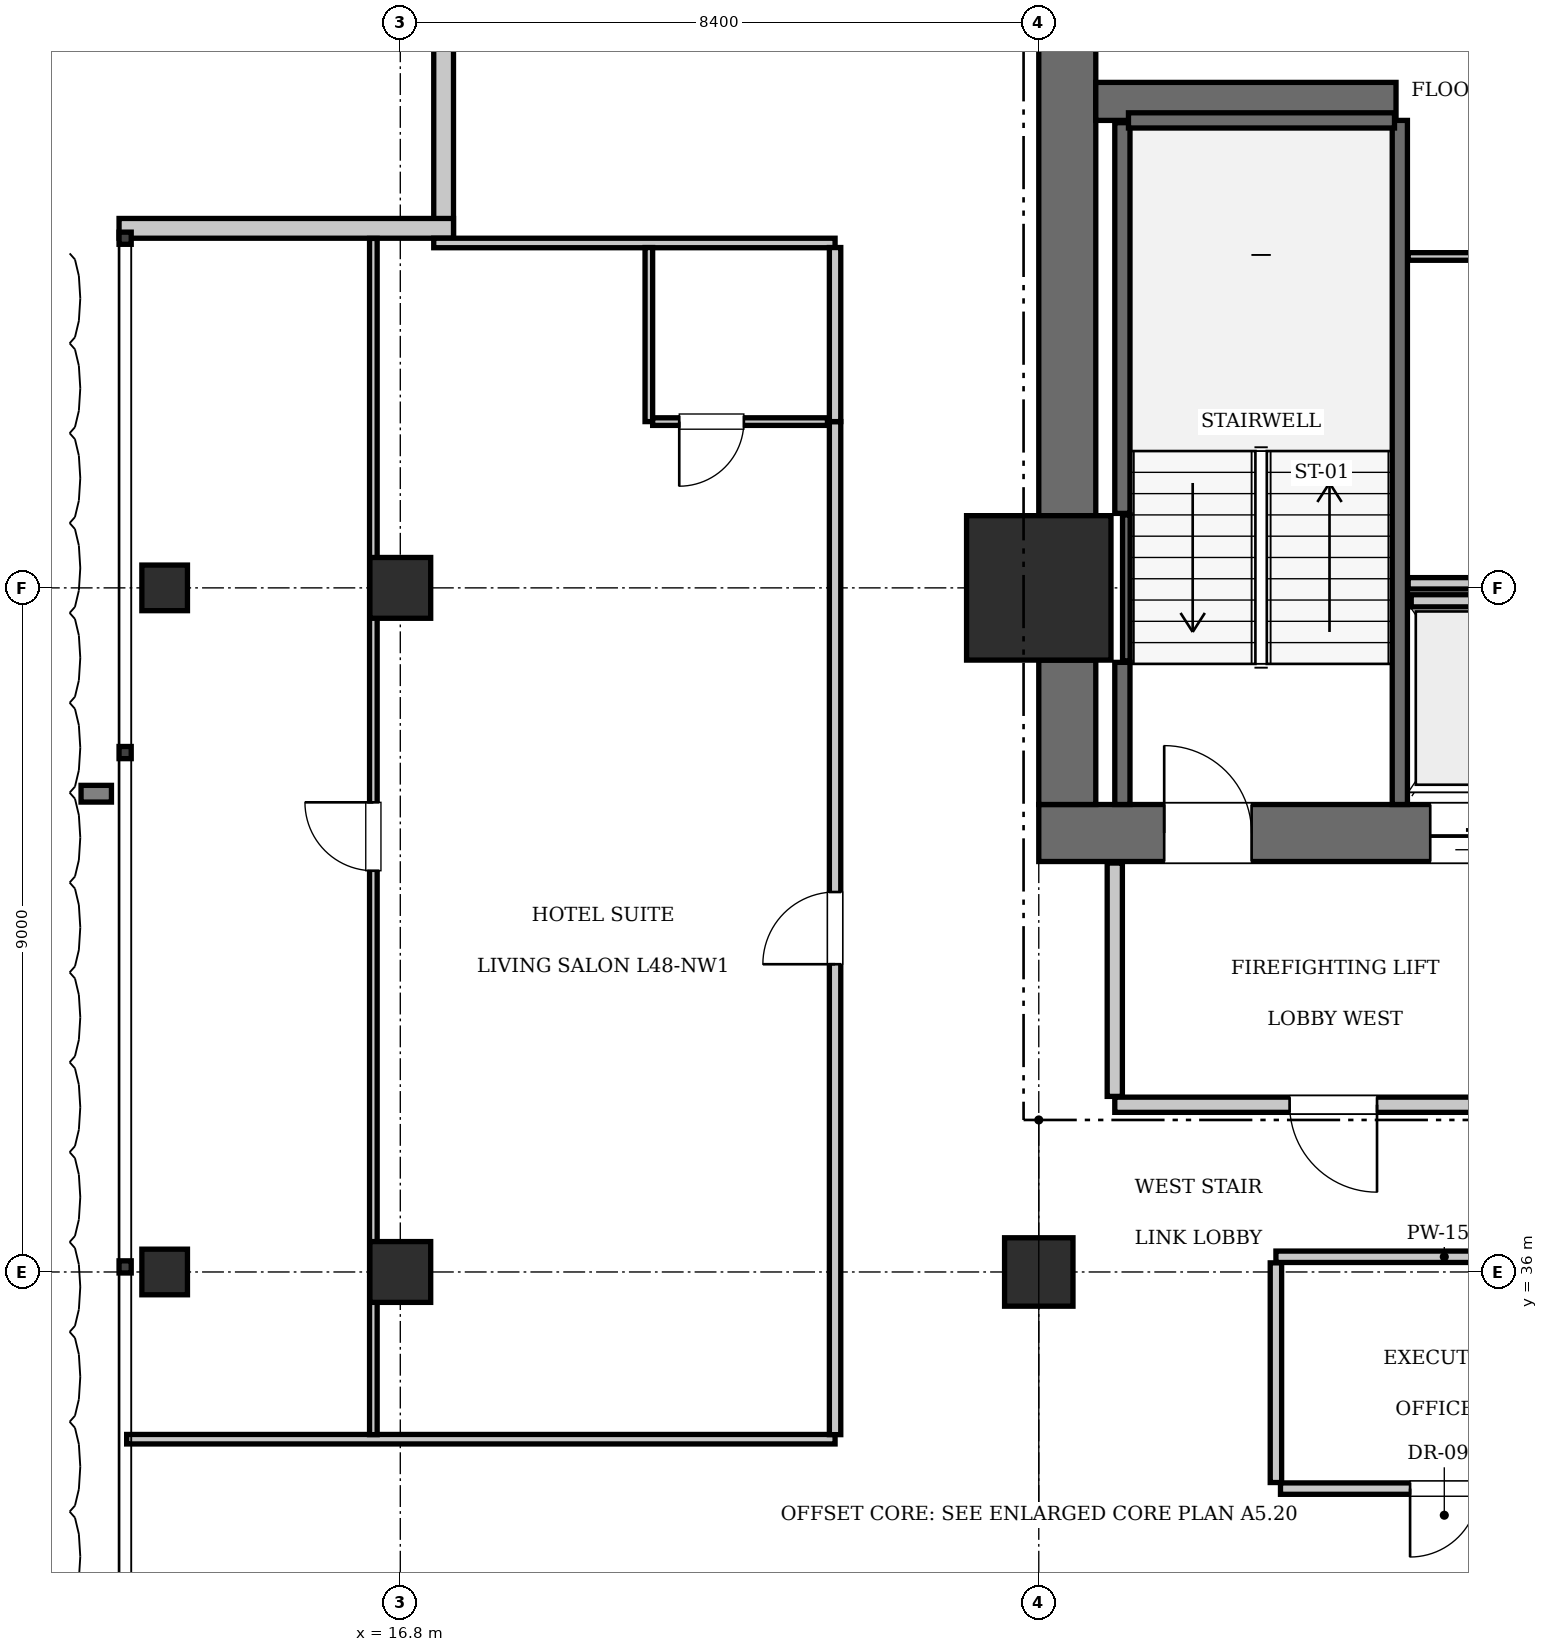
"""IFC4 building model, lengths in metres.
Left out: names, types, materials, properties, quantities, classifications, styles, units other than length and angle.
Written with IfcOpenShell. Run it as: python <this file> out.ifc"""

import sys

from ifc_helpers import new_model, si_unit, direction, frame, frame_2d, origin, origin_2d, place, context, subcontext, project, spatial, rectangle, i_section, extrude, element, fill, save


model = new_model("IFC4")
c1 = context("Model", 3, precision=1e-05, world=origin(), true_north=direction((0.0, 1.0)))
c2 = subcontext(c1, "Body", "Model", "MODEL_VIEW")
j1 = project(units=[si_unit("LENGTHUNIT", "METRE"), si_unit("PLANEANGLEUNIT", "RADIAN")], contexts=[c1])
p1 = place(None, origin())
s1 = spatial("IfcSite", under=j1, at=p1, CompositionType="ELEMENT")
p2 = place(p1, origin())
s2 = spatial("IfcBuilding", under=s1, at=p2, CompositionType="ELEMENT")
p3 = place(p2, frame((0.0, 0.0, 196.7)))
s3 = spatial("IfcBuildingStorey", under=s2, at=p3, CompositionType="ELEMENT", Elevation=196.7)
p4 = place(p3, frame((25.2, 45.0, 0.0), z_axis=(0.0, 0.0, 1.0), x_axis=(1.0, 0.0, 0.0)))
e1 = element("IfcColumn", 1, at=p4, inside=s3, PredefinedType="COLUMN", context=c2, shape_type="SweptSolid", body=[
    extrude(rectangle(XDim=1.9, YDim=1.9, at=origin_2d()), origin(), (0.0, 0.0, 1.0), 3.85),
])
p5 = place(p3, frame((25.2, 41.775, 0.0), z_axis=(0.0, 0.0, 1.0), x_axis=(1.0, 0.0, 0.0)))
e2 = element("IfcWall", 2, at=p5, inside=s3, PredefinedType="SHEAR", context=c2, shape_type="SweptSolid", body=[
    extrude(rectangle(XDim=6.8, YDim=0.75, at=frame_2d((3.4, 0.0))), origin(), (0.0, 0.0, 1.0), 3.85),
])
p6 = place(p5, frame((1.65, 0.0, 0.0)))
e3 = element("IfcOpeningElement", 3, at=p6, cuts=e2, PredefinedType="OPENING", context=c2, shape_type="SweptSolid", body=[
    extrude(rectangle(XDim=1.15, YDim=2.15, at=frame_2d((0.575, 1.075))), frame((0.0, 0.385, 0.0), z_axis=(0.0, -1.0, 0.0), x_axis=(1.0, 0.0, 0.0)), (0.0, 0.0, 1.0), 0.77),
])
p7 = place(p5, frame((5.15, 0.0, 0.0)))
e4 = element("IfcOpeningElement", 4, at=p7, cuts=e2, PredefinedType="OPENING", context=c2, shape_type="SweptSolid", body=[
    extrude(rectangle(XDim=1.1, YDim=2.2, at=frame_2d((0.55, 1.1))), frame((0.0, 0.385, 0.0), z_axis=(0.0, -1.0, 0.0), x_axis=(1.0, 0.0, 0.0)), (0.0, 0.0, 1.0), 0.77),
])
p8 = place(p3, frame((25.575, 42.15, 0.0), z_axis=(0.0, 0.0, 1.0), x_axis=(0.0, 1.0, 0.0)))
e5 = element("IfcWall", 5, at=p8, inside=s3, PredefinedType="SHEAR", context=c2, shape_type="SweptSolid", body=[
    extrude(rectangle(XDim=1.9, YDim=0.75, at=frame_2d((0.95, 0.0))), origin(), (0.0, 0.0, 1.0), 3.85),
])
p9 = place(p3, frame((25.575, 45.95, 0.0), z_axis=(0.0, 0.0, 1.0), x_axis=(0.0, 1.0, 0.0)))
e6 = element("IfcWall", 6, at=p9, inside=s3, PredefinedType="SHEAR", context=c2, shape_type="SweptSolid", body=[
    extrude(rectangle(XDim=7.3, YDim=0.75, at=frame_2d((3.65, 0.0))), origin(), (0.0, 0.0, 1.0), 3.85),
])
p10 = place(p3, frame((25.95, 51.4, 0.0), z_axis=(0.0, 0.0, 1.0), x_axis=(1.0, 0.0, 0.0)))
e7 = element("IfcWall", 7, at=p10, inside=s3, PredefinedType="SHEAR", context=c2, shape_type="SweptSolid", body=[
    extrude(rectangle(XDim=3.95, YDim=0.5, at=frame_2d((1.975, 0.0))), origin(), (0.0, 0.0, 1.0), 3.85),
])
p11 = place(p3, frame((25.2, 36.0, 0.0), z_axis=(0.0, 0.0, 1.0), x_axis=(1.0, 0.0, 0.0)))
e8 = element("IfcColumn", 8, at=p11, inside=s3, PredefinedType="COLUMN", context=c2, shape_type="SweptSolid", body=[
    extrude(rectangle(XDim=0.9, YDim=0.9, at=origin_2d()), origin(), (0.0, 0.0, 1.0), 3.85),
])
for number, where, z_axis, x_axis in (
    (9, (16.8, 36.0, 0.0), (0.0, 0.0, 1.0), (1.0, 0.0, 0.0)),
    (10, (16.8, 45.0, 0.0), (0.0, 0.0, 1.0), (1.0, 0.0, 0.0)),
):
    element("IfcColumn", number, at=place(p3, frame(where, z_axis=z_axis, x_axis=x_axis)), inside=s3, PredefinedType="COLUMN", context=c2, shape_type="SweptSolid", body=[
        extrude(rectangle(XDim=0.8, YDim=0.8, at=origin_2d()), origin(), (0.0, 0.0, 1.0), 3.85),
    ])
for number, where, z_axis, x_axis in (
    (11, (13.7, 36.0, 0.0), (0.0, 0.0, 1.0), (1.0, 0.0, 0.0)),
    (12, (13.7, 45.0, 0.0), (0.0, 0.0, 1.0), (1.0, 0.0, 0.0)),
):
    element("IfcColumn", number, at=place(p3, frame(where, z_axis=z_axis, x_axis=x_axis)), inside=s3, PredefinedType="COLUMN", context=c2, shape_type="SweptSolid", body=[
        extrude(i_section(OverallWidth=0.6, OverallDepth=0.6, WebThickness=0.025, FlangeThickness=0.038, at=origin_2d()), origin(), (0.0, 0.0, 1.0), 3.85),
    ])
p12 = place(p3, frame((29.95, 42.15, 0.0), z_axis=(0.0, 0.0, 1.0), x_axis=(0.0, 1.0, 0.0)))
e13 = element("IfcWall", 13, at=p12, inside=s3, PredefinedType="SOLIDWALL", context=c2, shape_type="SweptSolid", body=[
    extrude(rectangle(XDim=9.0, YDim=0.2, at=frame_2d((4.5, 0.0))), origin(), (0.0, 0.0, 1.0), 3.61),
])
p13 = place(p3, frame((26.3, 42.15, 0.0), z_axis=(0.0, 0.0, 1.0), x_axis=(0.0, 1.0, 0.0)))
e14 = element("IfcWall", 14, at=p13, inside=s3, PredefinedType="SOLIDWALL", context=c2, shape_type="SweptSolid", body=[
    extrude(rectangle(XDim=1.87, YDim=0.2, at=frame_2d((0.935, 0.0))), origin(), (0.0, 0.0, 1.0), 3.61),
])
p14 = place(p3, frame((26.3, 45.98, 0.0), z_axis=(0.0, 0.0, 1.0), x_axis=(0.0, 1.0, 0.0)))
e15 = element("IfcWall", 15, at=p14, inside=s3, PredefinedType="SOLIDWALL", context=c2, shape_type="SweptSolid", body=[
    extrude(rectangle(XDim=5.14, YDim=0.2, at=frame_2d((2.57, 0.0))), origin(), (0.0, 0.0, 1.0), 3.61),
])
p15 = place(p3, frame((26.38, 51.15, 0.0), z_axis=(0.0, 0.0, 1.0), x_axis=(1.0, 0.0, 0.0)))
e16 = element("IfcWall", 16, at=p15, inside=s3, PredefinedType="SOLIDWALL", context=c2, shape_type="SweptSolid", body=[
    extrude(rectangle(XDim=3.5, YDim=0.2, at=frame_2d((1.75, 0.0))), origin(), (0.0, 0.0, 1.0), 3.61),
])
p16 = place(p3, frame((26.352, 44.04, 0.0), z_axis=(0.0, 0.0, 1.0), x_axis=(0.0, 1.0, 0.0)))
e17 = element("IfcWall", 17, at=p16, inside=s3, PredefinedType="SOLIDWALL", context=c2, shape_type="SweptSolid", body=[
    extrude(rectangle(XDim=1.92, YDim=0.1, at=frame_2d((0.96, 0.0))), origin(), (0.0, 0.0, 1.0), 3.61),
])
p17 = place(p3, frame((30.1, 44.83, 0.0), z_axis=(0.0, 0.0, 1.0), x_axis=(1.0, 0.0, 0.0)))
e18 = element("IfcWall", 18, at=p17, inside=s3, PredefinedType="SOLIDWALL", context=c2, shape_type="SweptSolid", body=[
    extrude(rectangle(XDim=1.6, YDim=0.16, at=frame_2d((0.8, 0.0))), origin(), (0.0, 0.0, 1.0), 3.61),
])
for number, where, z_axis, x_axis in (
    (19, (17.37, 49.6, 0.0), (0.0, 0.0, 1.0), (0.0, 1.0, 0.0)),
    (20, (13.1, 49.73, 0.0), (0.0, 0.0, 1.0), (1.0, 0.0, 0.0)),
):
    element("IfcWall", number, at=place(p3, frame(where, z_axis=z_axis, x_axis=x_axis)), inside=s3, PredefinedType="SOLIDWALL", context=c2, shape_type="SweptSolid", body=[
        extrude(rectangle(XDim=4.4, YDim=0.26, at=frame_2d((2.2, 0.0))), origin(), (0.0, 0.0, 1.0), 3.61),
    ])
p18 = place(p3, frame((26.2, 38.2, 0.0), z_axis=(0.0, 0.0, 1.0), x_axis=(1.0, 0.0, 0.0)))
e21 = element("IfcWall", 21, at=p18, inside=s3, PredefinedType="PARTITIONING", context=c2, shape_type="SweptSolid", body=[
    extrude(rectangle(XDim=5.8, YDim=0.2, at=frame_2d((2.9, 0.0))), origin(), (0.0, 0.0, 1.0), 3.61),
])
p19 = place(p18, frame((2.3, 0.0, 0.0)))
e22 = element("IfcOpeningElement", 22, at=p19, cuts=e21, PredefinedType="OPENING", context=c2, shape_type="SweptSolid", body=[
    extrude(rectangle(XDim=1.15, YDim=2.15, at=frame_2d((0.575, 1.075))), frame((0.0, 0.11, 0.0), z_axis=(0.0, -1.0, 0.0), x_axis=(1.0, 0.0, 0.0)), (0.0, 0.0, 1.0), 0.22),
])
p20 = place(p3, frame((26.2, 38.31, 0.0), z_axis=(0.0, 0.0, 1.0), x_axis=(0.0, 1.0, 0.0)))
e23 = element("IfcWall", 23, at=p20, inside=s3, PredefinedType="PARTITIONING", context=c2, shape_type="SweptSolid", body=[
    extrude(rectangle(XDim=3.07, YDim=0.2, at=frame_2d((1.535, 0.0))), origin(), (0.0, 0.0, 1.0), 3.61),
])
p21 = place(p3, frame((30.06, 45.06, 0.0), z_axis=(0.0, 0.0, 1.0), x_axis=(1.0, 0.0, 0.0)))
e24 = element("IfcWall", 24, at=p21, inside=s3, PredefinedType="PARTITIONING", context=c2, shape_type="SweptSolid", body=[
    extrude(rectangle(XDim=3.18, YDim=0.15, at=frame_2d((1.59, 0.0))), origin(), (0.0, 0.0, 1.0), 3.61),
])
p22 = place(p3, frame((30.06, 49.36, 0.0), z_axis=(0.0, 0.0, 1.0), x_axis=(1.0, 0.0, 0.0)))
e25 = element("IfcWall", 25, at=p22, inside=s3, PredefinedType="PARTITIONING", context=c2, shape_type="SweptSolid", body=[
    extrude(rectangle(XDim=3.18, YDim=0.1, at=frame_2d((1.59, 0.0))), origin(), (0.0, 0.0, 1.0), 3.61),
])
p23 = place(p22, frame((1.95, 0.0, 0.0)))
e26 = element("IfcOpeningElement", 26, at=p23, cuts=e25, PredefinedType="OPENING", context=c2, shape_type="SweptSolid", body=[
    extrude(rectangle(XDim=0.8, YDim=2.05, at=frame_2d((0.4, 1.025))), frame((0.0, 0.06, 0.0), z_axis=(0.0, -1.0, 0.0), x_axis=(1.0, 0.0, 0.0)), (0.0, 0.0, 1.0), 0.12),
])
p24 = place(p3, frame((28.32, 36.2, 0.0), z_axis=(0.0, 0.0, 1.0), x_axis=(1.0, 0.0, 0.0)))
e27 = element("IfcWall", 27, at=p24, inside=s3, PredefinedType="PARTITIONING", context=c2, shape_type="SweptSolid", body=[
    extrude(rectangle(XDim=4.43, YDim=0.15, at=frame_2d((2.215, 0.0))), origin(), (0.0, 0.0, 1.0), 3.61),
])
p25 = place(p3, frame((28.32, 33.23, 0.0), z_axis=(0.0, 0.0, 1.0), x_axis=(0.0, 1.0, 0.0)))
e28 = element("IfcWall", 28, at=p25, inside=s3, PredefinedType="PARTITIONING", context=c2, shape_type="SweptSolid", body=[
    extrude(rectangle(XDim=2.89, YDim=0.15, at=frame_2d((1.445, 0.0))), origin(), (0.0, 0.0, 1.0), 3.61),
])
p26 = place(p3, frame((28.38, 33.15, 0.0), z_axis=(0.0, 0.0, 1.0), x_axis=(1.0, 0.0, 0.0)))
e29 = element("IfcWall", 29, at=p26, inside=s3, PredefinedType="PARTITIONING", context=c2, shape_type="SweptSolid", body=[
    extrude(rectangle(XDim=4.31, YDim=0.15, at=frame_2d((2.155, 0.0))), origin(), (0.0, 0.0, 1.0), 3.61),
])
p27 = place(p26, frame((1.705, 0.0, 0.0)))
e30 = element("IfcOpeningElement", 30, at=p27, cuts=e29, PredefinedType="OPENING", context=c2, shape_type="SweptSolid", body=[
    extrude(rectangle(XDim=0.9, YDim=2.1, at=frame_2d((0.45, 1.05))), frame((0.0, 0.085, 0.0), z_axis=(0.0, -1.0, 0.0), x_axis=(1.0, 0.0, 0.0)), (0.0, 0.0, 1.0), 0.17),
])
p28 = place(p3, frame((13.2, 33.8, 0.0), z_axis=(0.0, 0.0, 1.0), x_axis=(1.0, 0.0, 0.0)))
e31 = element("IfcWall", 31, at=p28, inside=s3, PredefinedType="PARTITIONING", context=c2, shape_type="SweptSolid", body=[
    extrude(rectangle(XDim=9.32, YDim=0.125, at=frame_2d((4.66, 0.0))), origin(), (0.0, 0.0, 1.0), 3.61),
])
p29 = place(p3, frame((17.24, 49.538, 0.0), z_axis=(0.0, 0.0, 1.0), x_axis=(1.0, 0.0, 0.0)))
e32 = element("IfcWall", 32, at=p29, inside=s3, PredefinedType="PARTITIONING", context=c2, shape_type="SweptSolid", body=[
    extrude(rectangle(XDim=5.28, YDim=0.125, at=frame_2d((2.64, 0.0))), origin(), (0.0, 0.0, 1.0), 3.61),
])
p30 = place(p3, frame((22.52, 33.86, 0.0), z_axis=(0.0, 0.0, 1.0), x_axis=(0.0, 1.0, 0.0)))
e33 = element("IfcWall", 33, at=p30, inside=s3, PredefinedType="PARTITIONING", context=c2, shape_type="SweptSolid", body=[
    extrude(rectangle(XDim=13.327, YDim=0.15, at=frame_2d((6.664, 0.0))), origin(), (0.0, 0.0, 1.0), 3.61),
])
p31 = place(p30, frame((6.189, 0.0, 0.0)))
e34 = element("IfcOpeningElement", 34, at=p31, cuts=e33, PredefinedType="OPENING", context=c2, shape_type="SweptSolid", body=[
    extrude(rectangle(XDim=0.95, YDim=2.15, at=frame_2d((0.475, 1.075))), frame((0.0, 0.085, 0.0), z_axis=(0.0, -1.0, 0.0), x_axis=(1.0, 0.0, 0.0)), (0.0, 0.0, 1.0), 0.17),
])
p32 = place(p3, frame((22.52, 47.188, 0.0), z_axis=(0.0, 0.0, 1.0), x_axis=(0.0, 1.0, 0.0)))
e35 = element("IfcWall", 35, at=p32, inside=s3, PredefinedType="PARTITIONING", context=c2, shape_type="SweptSolid", body=[
    extrude(rectangle(XDim=2.29, YDim=0.15, at=frame_2d((1.145, 0.0))), origin(), (0.0, 0.0, 1.0), 3.61),
])
p33 = place(p3, frame((20.07, 47.188, 0.0), z_axis=(0.0, 0.0, 1.0), x_axis=(0.0, 1.0, 0.0)))
e36 = element("IfcWall", 36, at=p33, inside=s3, PredefinedType="PARTITIONING", context=c2, shape_type="SweptSolid", body=[
    extrude(rectangle(XDim=2.29, YDim=0.1, at=frame_2d((1.145, 0.0))), origin(), (0.0, 0.0, 1.0), 3.61),
])
p34 = place(p3, frame((20.12, 47.188, 0.0), z_axis=(0.0, 0.0, 1.0), x_axis=(1.0, 0.0, 0.0)))
e37 = element("IfcWall", 37, at=p34, inside=s3, PredefinedType="PARTITIONING", context=c2, shape_type="SweptSolid", body=[
    extrude(rectangle(XDim=2.3, YDim=0.1, at=frame_2d((1.15, 0.0))), origin(), (0.0, 0.0, 1.0), 3.61),
])
p35 = place(p34, frame((0.35, 0.0, 0.0)))
e38 = element("IfcOpeningElement", 38, at=p35, cuts=e37, PredefinedType="OPENING", context=c2, shape_type="SweptSolid", body=[
    extrude(rectangle(XDim=0.85, YDim=2.1, at=frame_2d((0.425, 1.05))), frame((0.0, 0.06, 0.0), z_axis=(0.0, -1.0, 0.0), x_axis=(1.0, 0.0, 0.0)), (0.0, 0.0, 1.0), 0.12),
])
p36 = place(p3, frame((16.446, 33.86, 0.0), z_axis=(0.0, 0.0, 1.0), x_axis=(0.0, 1.0, 0.0)))
e39 = element("IfcWall", 39, at=p36, inside=s3, PredefinedType="PARTITIONING", context=c2, shape_type="SweptSolid", body=[
    extrude(rectangle(XDim=15.737, YDim=0.1, at=frame_2d((7.869, 0.0))), origin(), (0.0, 0.0, 1.0), 3.61),
])
p37 = place(p36, frame((7.419, 0.0, 0.0)))
e40 = element("IfcOpeningElement", 40, at=p37, cuts=e39, PredefinedType="OPENING", context=c2, shape_type="SweptSolid", body=[
    extrude(rectangle(XDim=0.9, YDim=2.1, at=frame_2d((0.45, 1.05))), frame((0.0, 0.06, 0.0), z_axis=(0.0, -1.0, 0.0), x_axis=(1.0, 0.0, 0.0)), (0.0, 0.0, 1.0), 0.12),
])
p38 = place(p6, origin())
e41 = element("IfcDoor", 41, at=p38, inside=s3, OperationType="SINGLE_SWING_LEFT", PredefinedType="DOOR", context=c2, shape_type="SweptSolid", body=[
    extrude(rectangle(XDim=1.15, YDim=2.15, at=frame_2d((0.575, 1.075))), frame((0.0, 0.025, 0.0), z_axis=(0.0, -1.0, 0.0), x_axis=(1.0, 0.0, 0.0)), (0.0, 0.0, 1.0), 0.05),
])
fill(e3, e41)
p39 = place(p7, frame((1.1, 0.0, 0.0), z_axis=(0.0, 0.0, 1.0), x_axis=(-1.0, 0.0, 0.0)))
e42 = element("IfcDoor", 42, at=p39, inside=s3, OperationType="SLIDING_TO_LEFT", PredefinedType="DOOR", context=c2, shape_type="SweptSolid", body=[
    extrude(rectangle(XDim=1.1, YDim=2.2, at=frame_2d((0.55, 1.1))), frame((0.0, 0.025, 0.0), z_axis=(0.0, -1.0, 0.0), x_axis=(1.0, 0.0, 0.0)), (0.0, 0.0, 1.0), 0.05),
])
fill(e4, e42)
p40 = place(p19, frame((1.15, 0.0, 0.0), z_axis=(0.0, 0.0, 1.0), x_axis=(-1.0, 0.0, 0.0)))
e43 = element("IfcDoor", 43, at=p40, inside=s3, OperationType="SINGLE_SWING_LEFT", PredefinedType="DOOR", context=c2, shape_type="SweptSolid", body=[
    extrude(rectangle(XDim=1.15, YDim=2.15, at=frame_2d((0.575, 1.075))), frame((0.0, 0.025, 0.0), z_axis=(0.0, -1.0, 0.0), x_axis=(1.0, 0.0, 0.0)), (0.0, 0.0, 1.0), 0.05),
])
fill(e22, e43)
p41 = place(p27, frame((0.9, 0.0, 0.0), z_axis=(0.0, 0.0, 1.0), x_axis=(-1.0, 0.0, 0.0)))
e44 = element("IfcDoor", 44, at=p41, inside=s3, OperationType="SINGLE_SWING_RIGHT", PredefinedType="DOOR", context=c2, shape_type="SweptSolid", body=[
    extrude(rectangle(XDim=0.9, YDim=2.1, at=frame_2d((0.45, 1.05))), frame((0.0, 0.025, 0.0), z_axis=(0.0, -1.0, 0.0), x_axis=(1.0, 0.0, 0.0)), (0.0, 0.0, 1.0), 0.05),
])
fill(e30, e44)
p42 = place(p35, frame((0.85, 0.0, 0.0), z_axis=(0.0, 0.0, 1.0), x_axis=(-1.0, 0.0, 0.0)))
e45 = element("IfcDoor", 45, at=p42, inside=s3, OperationType="SINGLE_SWING_RIGHT", PredefinedType="DOOR", context=c2, shape_type="SweptSolid", body=[
    extrude(rectangle(XDim=0.85, YDim=2.1, at=frame_2d((0.425, 1.05))), frame((0.0, 0.025, 0.0), z_axis=(0.0, -1.0, 0.0), x_axis=(1.0, 0.0, 0.0)), (0.0, 0.0, 1.0), 0.05),
])
fill(e38, e45)
p43 = place(p31, origin())
e46 = element("IfcDoor", 46, at=p43, inside=s3, OperationType="SINGLE_SWING_LEFT", PredefinedType="DOOR", context=c2, shape_type="SweptSolid", body=[
    extrude(rectangle(XDim=0.95, YDim=2.15, at=frame_2d((0.475, 1.075))), frame((0.0, 0.025, 0.0), z_axis=(0.0, -1.0, 0.0), x_axis=(1.0, 0.0, 0.0)), (0.0, 0.0, 1.0), 0.05),
])
fill(e34, e46)
p44 = place(p37, origin())
e47 = element("IfcDoor", 47, at=p44, inside=s3, OperationType="SINGLE_SWING_RIGHT", PredefinedType="DOOR", context=c2, shape_type="SweptSolid", body=[
    extrude(rectangle(XDim=0.9, YDim=2.1, at=frame_2d((0.45, 1.05))), frame((0.0, 0.025, 0.0), z_axis=(0.0, -1.0, 0.0), x_axis=(1.0, 0.0, 0.0)), (0.0, 0.0, 1.0), 0.05),
])
fill(e40, e47)
save(model, sys.argv[1])
